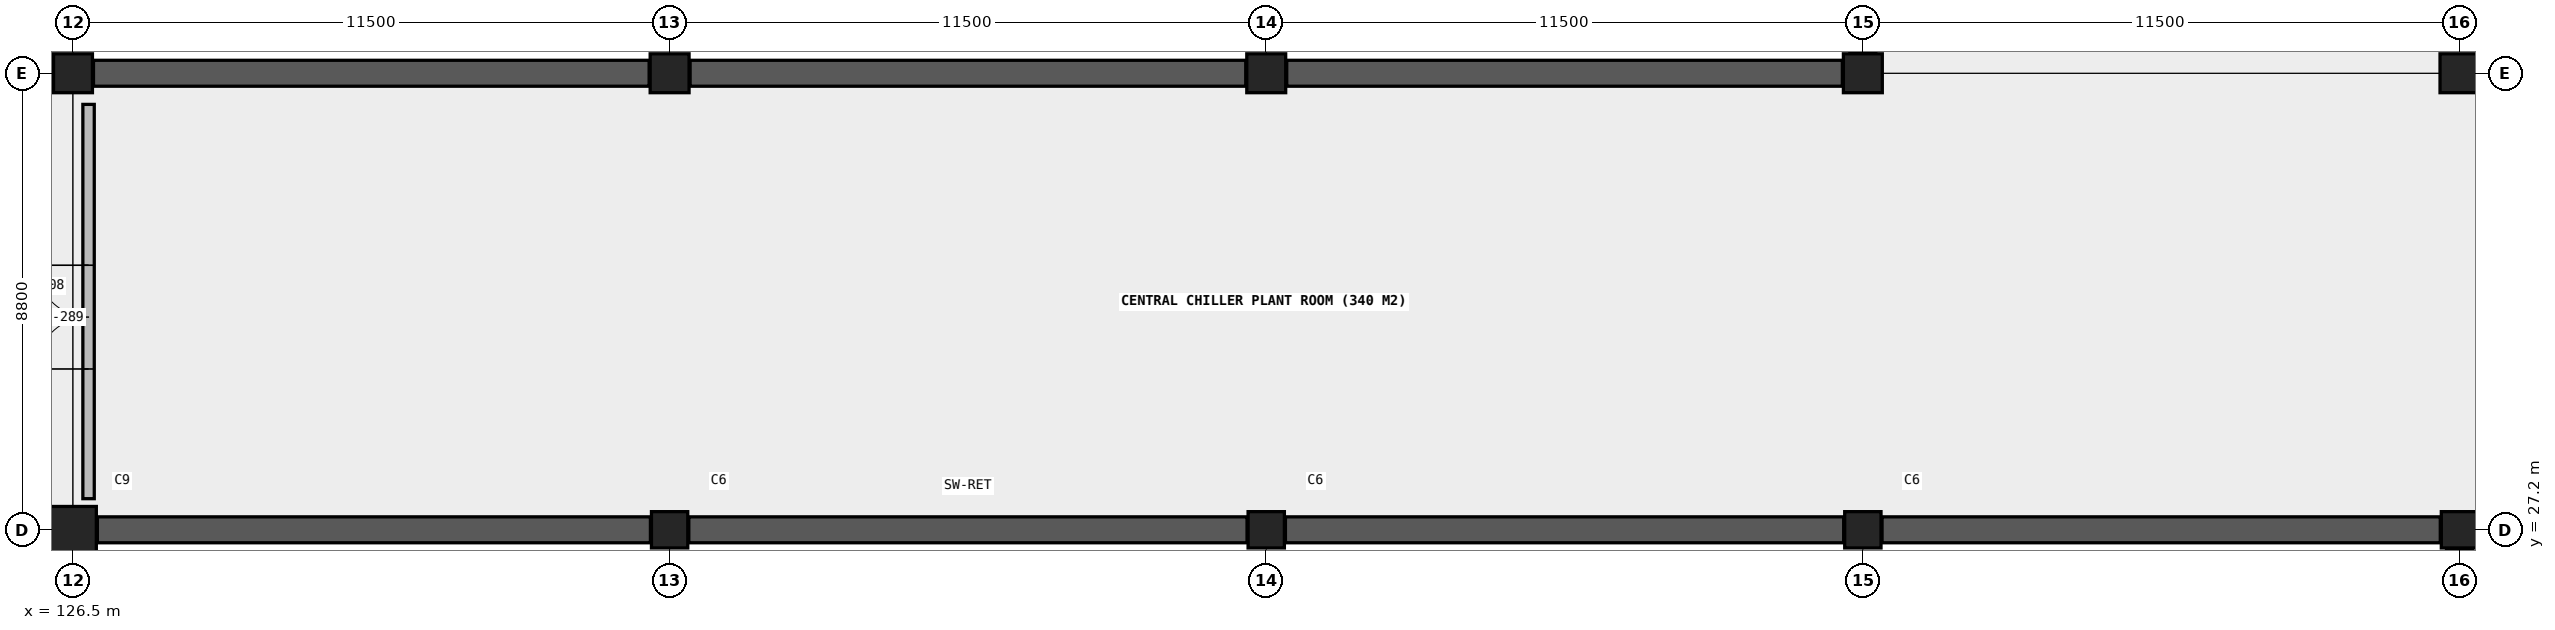
"""IFC4 building model, lengths in metres.
Left out: names, types, materials, properties, quantities, classifications, styles, units other than length and angle.
Written with IfcOpenShell. Run it as: python <this file> out.ifc"""

import sys

from ifc_helpers import new_model, si_unit, direction, frame, frame_2d, origin, origin_2d, place, context, subcontext, project, spatial, rectangle, circle, extrude, element, fill, save


model = new_model("IFC4")
c1 = context("Model", 3, precision=1e-05, world=origin(), true_north=direction((0.0, 1.0)))
c2 = subcontext(c1, "Body", "Model", "MODEL_VIEW")
j1 = project(units=[si_unit("LENGTHUNIT", "METRE"), si_unit("PLANEANGLEUNIT", "RADIAN")], contexts=[c1])
p1 = place(None, origin())
s1 = spatial("IfcSite", under=j1, at=p1, CompositionType="ELEMENT")
p2 = place(p1, origin())
s2 = spatial("IfcBuilding", under=s1, at=p2, CompositionType="ELEMENT")
p3 = place(p2, frame((0.0, 0.0, -8.4)))
s3 = spatial("IfcBuildingStorey", under=s2, at=p3, CompositionType="ELEMENT", Elevation=-8.4)
p4 = place(p3, frame((126.5, 27.2, 0.0), z_axis=(0.0, 0.0, 1.0), x_axis=(1.0, 0.0, 0.0)))
e1 = element("IfcColumn", 1, at=p4, inside=s3, PredefinedType="COLUMN", context=c2, shape_type="SweptSolid", body=[
    extrude(circle(Radius=0.45, at=origin_2d()), origin(), (0.0, 0.0, 1.0), 4.2),
])
p5 = place(p3, frame((126.5, 36.0, 0.0), z_axis=(0.0, 0.0, 1.0), x_axis=(1.0, 0.0, 0.0)))
e2 = element("IfcColumn", 2, at=p5, inside=s3, PredefinedType="COLUMN", context=c2, shape_type="SweptSolid", body=[
    extrude(rectangle(XDim=0.75, YDim=0.75, at=origin_2d()), origin(), (0.0, 0.0, 1.0), 4.2),
])
p6 = place(p3, frame((138.0, 27.2, 0.0), z_axis=(0.0, 0.0, 1.0), x_axis=(1.0, 0.0, 0.0)))
e3 = element("IfcColumn", 3, at=p6, inside=s3, PredefinedType="COLUMN", context=c2, shape_type="SweptSolid", body=[
    extrude(rectangle(XDim=0.7, YDim=0.7, at=origin_2d()), origin(), (0.0, 0.0, 1.0), 4.2),
])
p7 = place(p3, frame((138.0, 36.0, 0.0), z_axis=(0.0, 0.0, 1.0), x_axis=(1.0, 0.0, 0.0)))
e4 = element("IfcColumn", 4, at=p7, inside=s3, PredefinedType="COLUMN", context=c2, shape_type="SweptSolid", body=[
    extrude(rectangle(XDim=0.75, YDim=0.75, at=origin_2d()), origin(), (0.0, 0.0, 1.0), 4.2),
])
p8 = place(p3, frame((149.5, 27.2, 0.0), z_axis=(0.0, 0.0, 1.0), x_axis=(1.0, 0.0, 0.0)))
e5 = element("IfcColumn", 5, at=p8, inside=s3, PredefinedType="COLUMN", context=c2, shape_type="SweptSolid", body=[
    extrude(rectangle(XDim=0.7, YDim=0.7, at=origin_2d()), origin(), (0.0, 0.0, 1.0), 4.2),
])
p9 = place(p3, frame((149.5, 36.0, 0.0), z_axis=(0.0, 0.0, 1.0), x_axis=(1.0, 0.0, 0.0)))
e6 = element("IfcColumn", 6, at=p9, inside=s3, PredefinedType="COLUMN", context=c2, shape_type="SweptSolid", body=[
    extrude(rectangle(XDim=0.75, YDim=0.75, at=origin_2d()), origin(), (0.0, 0.0, 1.0), 4.2),
])
p10 = place(p3, frame((161.0, 27.2, 0.0), z_axis=(0.0, 0.0, 1.0), x_axis=(1.0, 0.0, 0.0)))
e7 = element("IfcColumn", 7, at=p10, inside=s3, PredefinedType="COLUMN", context=c2, shape_type="SweptSolid", body=[
    extrude(rectangle(XDim=0.7, YDim=0.7, at=origin_2d()), origin(), (0.0, 0.0, 1.0), 4.2),
])
p11 = place(p3, frame((161.0, 36.0, 0.0), z_axis=(0.0, 0.0, 1.0), x_axis=(1.0, 0.0, 0.0)))
e8 = element("IfcColumn", 8, at=p11, inside=s3, PredefinedType="COLUMN", context=c2, shape_type="SweptSolid", body=[
    extrude(rectangle(XDim=0.75, YDim=0.75, at=origin_2d()), origin(), (0.0, 0.0, 1.0), 4.2),
])
p12 = place(p3, frame((172.5, 27.2, 0.0), z_axis=(0.0, 0.0, 1.0), x_axis=(1.0, 0.0, 0.0)))
e9 = element("IfcColumn", 9, at=p12, inside=s3, PredefinedType="COLUMN", context=c2, shape_type="SweptSolid", body=[
    extrude(rectangle(XDim=0.7, YDim=0.7, at=origin_2d()), origin(), (0.0, 0.0, 1.0), 4.2),
])
p13 = place(p3, frame((172.5, 36.0, 0.0), z_axis=(0.0, 0.0, 1.0), x_axis=(1.0, 0.0, 0.0)))
e10 = element("IfcColumn", 10, at=p13, inside=s3, PredefinedType="COLUMN", context=c2, shape_type="SweptSolid", body=[
    extrude(rectangle(XDim=0.75, YDim=0.75, at=origin_2d()), origin(), (0.0, 0.0, 1.0), 4.2),
])
p14 = place(p3, frame((126.97, 27.2, 0.0), z_axis=(0.0, 0.0, 1.0), x_axis=(1.0, 0.0, 0.0)))
e11 = element("IfcWall", 11, at=p14, inside=s3, PredefinedType="SHEAR", context=c2, shape_type="SweptSolid", body=[
    extrude(rectangle(XDim=10.66, YDim=0.5, at=frame_2d((5.33, 0.0))), origin(), (0.0, 0.0, 1.0), 4.2),
])
for number, where, z_axis, x_axis in (
    (12, (138.37, 27.2, 0.0), (0.0, 0.0, 1.0), (1.0, 0.0, 0.0)),
    (13, (149.87, 27.2, 0.0), (0.0, 0.0, 1.0), (1.0, 0.0, 0.0)),
    (14, (161.37, 27.2, 0.0), (0.0, 0.0, 1.0), (1.0, 0.0, 0.0)),
):
    element("IfcWall", number, at=place(p3, frame(where, z_axis=z_axis, x_axis=x_axis)), inside=s3, PredefinedType="SHEAR", context=c2, shape_type="SweptSolid", body=[
        extrude(rectangle(XDim=10.76, YDim=0.5, at=frame_2d((5.38, 0.0))), origin(), (0.0, 0.0, 1.0), 4.2),
    ])
p15 = place(p3, frame((172.5, 17.97, 0.0), z_axis=(0.0, 0.0, 1.0), x_axis=(0.0, 1.0, 0.0)))
e15 = element("IfcWall", 15, at=p15, inside=s3, PredefinedType="SHEAR", context=c2, shape_type="SweptSolid", body=[
    extrude(rectangle(XDim=8.86, YDim=0.5, at=frame_2d((4.43, 0.0))), origin(), (0.0, 0.0, 1.0), 4.2),
])
for number, where, z_axis, x_axis in (
    (16, (115.395, 36.0, 0.0), (0.0, 0.0, 1.0), (1.0, 0.0, 0.0)),
    (17, (126.895, 36.0, 0.0), (0.0, 0.0, 1.0), (1.0, 0.0, 0.0)),
    (18, (138.395, 36.0, 0.0), (0.0, 0.0, 1.0), (1.0, 0.0, 0.0)),
    (19, (149.895, 36.0, 0.0), (0.0, 0.0, 1.0), (1.0, 0.0, 0.0)),
):
    element("IfcWall", number, at=place(p3, frame(where, z_axis=z_axis, x_axis=x_axis)), inside=s3, PredefinedType="SHEAR", context=c2, shape_type="SweptSolid", body=[
        extrude(rectangle(XDim=10.71, YDim=0.5, at=frame_2d((5.355, 0.0))), origin(), (0.0, 0.0, 1.0), 4.2),
    ])
p16 = place(p3, frame((161.0, 36.395, 0.0), z_axis=(0.0, 0.0, 1.0), x_axis=(0.0, 1.0, 0.0)))
e20 = element("IfcWall", 20, at=p16, inside=s3, PredefinedType="SHEAR", context=c2, shape_type="SweptSolid", body=[
    extrude(rectangle(XDim=41.21, YDim=0.5, at=frame_2d((20.605, 0.0))), origin(), (0.0, 0.0, 1.0), 4.2),
])
p17 = place(p3, frame((126.8, 27.8, 0.0), z_axis=(0.0, 0.0, 1.0), x_axis=(0.0, 1.0, 0.0)))
e21 = element("IfcWall", 21, at=p17, inside=s3, PredefinedType="SOLIDWALL", context=c2, shape_type="SweptSolid", body=[
    extrude(rectangle(XDim=7.6, YDim=0.22, at=frame_2d((3.8, 0.0))), origin(), (0.0, 0.0, 1.0), 3.02),
])
p18 = place(p17, frame((2.5, 0.0, 0.0)))
e22 = element("IfcOpeningElement", 22, at=p18, cuts=e21, PredefinedType="OPENING", context=c2, shape_type="SweptSolid", body=[
    extrude(rectangle(XDim=2.0, YDim=2.3, at=frame_2d((1.0, 1.15))), frame((0.0, 0.12, 0.0), z_axis=(0.0, -1.0, 0.0), x_axis=(1.0, 0.0, 0.0)), (0.0, 0.0, 1.0), 0.24),
])
p19 = place(p18, origin())
e23 = element("IfcDoor", 23, at=p19, inside=s3, OperationType="DOUBLE_DOOR_SINGLE_SWING", PredefinedType="DOOR", context=c2, shape_type="SweptSolid", body=[
    extrude(rectangle(XDim=2.0, YDim=2.3, at=frame_2d((1.0, 1.15))), frame((0.0, 0.025, 0.0), z_axis=(0.0, -1.0, 0.0), x_axis=(1.0, 0.0, 0.0)), (0.0, 0.0, 1.0), 0.05),
])
fill(e22, e23)
save(model, sys.argv[1])
